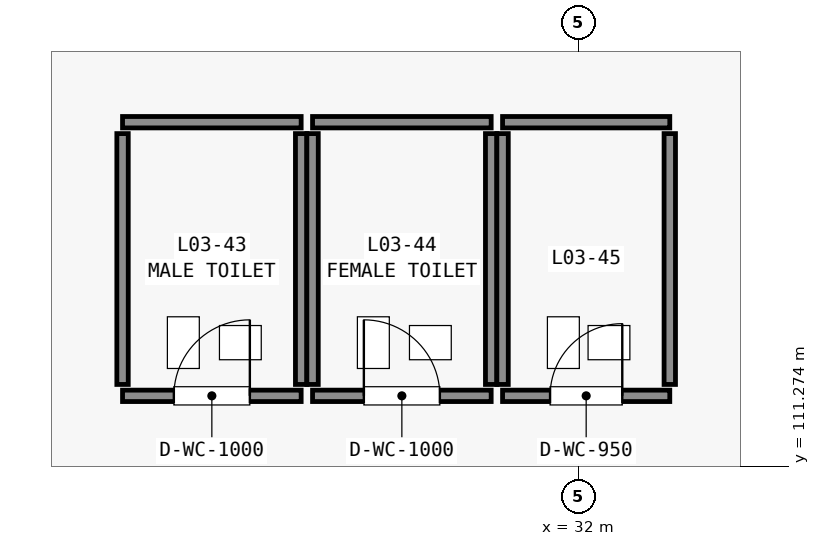
"""IFC4 building model, lengths in metres.
Left out: names, types, materials, properties, quantities, classifications, styles, units other than length and angle.
Written with IfcOpenShell. Run it as: python <this file> out.ifc"""

import sys

from ifc_helpers import new_model, si_unit, direction, frame, frame_2d, origin, place, context, subcontext, project, spatial, rectangle, extrude, element, fill, save


model = new_model("IFC4")
c1 = context("Model", 3, precision=1e-05, world=origin(), true_north=direction((0.0, 1.0)))
c2 = subcontext(c1, "Body", "Model", "MODEL_VIEW")
j1 = project(units=[si_unit("LENGTHUNIT", "METRE"), si_unit("PLANEANGLEUNIT", "RADIAN")], contexts=[c1])
p1 = place(None, origin())
s1 = spatial("IfcSite", under=j1, at=p1, CompositionType="ELEMENT")
p2 = place(p1, origin())
s2 = spatial("IfcBuilding", under=s1, at=p2, CompositionType="ELEMENT")
p3 = place(p2, frame((0.0, 0.0, 16.2)))
s3 = spatial("IfcBuildingStorey", under=s2, at=p3, CompositionType="ELEMENT", Elevation=16.2)
p4 = place(p3, frame((26.0, 112.2, 0.0), z_axis=(0.0, 0.0, 1.0), x_axis=(1.0, 0.0, 0.0)))
e1 = element("IfcWall", 1, at=p4, inside=s3, PredefinedType="STANDARD", context=c2, shape_type="SweptSolid", body=[
    extrude(rectangle(XDim=2.35, YDim=0.15, at=frame_2d((1.175, 0.0))), origin(), (0.0, 0.0, 1.0), 4.46),
])
p5 = place(p4, frame((0.675, 0.0, 0.0)))
e2 = element("IfcOpeningElement", 2, at=p5, cuts=e1, PredefinedType="OPENING", context=c2, shape_type="SweptSolid", body=[
    extrude(rectangle(XDim=1.0, YDim=2.15, at=frame_2d((0.5, 1.075))), frame((0.0, 0.085, 0.0), z_axis=(0.0, -1.0, 0.0), x_axis=(1.0, 0.0, 0.0)), (0.0, 0.0, 1.0), 0.17),
])
p6 = place(p3, frame((26.0, 115.8, 0.0), z_axis=(0.0, 0.0, 1.0), x_axis=(1.0, 0.0, 0.0)))
e3 = element("IfcWall", 3, at=p6, inside=s3, PredefinedType="STANDARD", context=c2, shape_type="SweptSolid", body=[
    extrude(rectangle(XDim=2.35, YDim=0.15, at=frame_2d((1.175, 0.0))), origin(), (0.0, 0.0, 1.0), 4.46),
])
for number, where, z_axis, x_axis in (
    (4, (26.0, 112.35, 0.0), (0.0, 0.0, 1.0), (0.0, 1.0, 0.0)),
    (5, (28.35, 112.35, 0.0), (0.0, 0.0, 1.0), (0.0, 1.0, 0.0)),
):
    element("IfcWall", number, at=place(p3, frame(where, z_axis=z_axis, x_axis=x_axis)), inside=s3, PredefinedType="STANDARD", context=c2, shape_type="SweptSolid", body=[
        extrude(rectangle(XDim=3.3, YDim=0.15, at=frame_2d((1.65, 0.0))), origin(), (0.0, 0.0, 1.0), 4.003),
    ])
p7 = place(p3, frame((28.5, 112.2, 0.0), z_axis=(0.0, 0.0, 1.0), x_axis=(1.0, 0.0, 0.0)))
e6 = element("IfcWall", 6, at=p7, inside=s3, PredefinedType="STANDARD", context=c2, shape_type="SweptSolid", body=[
    extrude(rectangle(XDim=2.35, YDim=0.15, at=frame_2d((1.175, 0.0))), origin(), (0.0, 0.0, 1.0), 4.46),
])
p8 = place(p7, frame((0.675, 0.0, 0.0)))
e7 = element("IfcOpeningElement", 7, at=p8, cuts=e6, PredefinedType="OPENING", context=c2, shape_type="SweptSolid", body=[
    extrude(rectangle(XDim=1.0, YDim=2.15, at=frame_2d((0.5, 1.075))), frame((0.0, 0.085, 0.0), z_axis=(0.0, -1.0, 0.0), x_axis=(1.0, 0.0, 0.0)), (0.0, 0.0, 1.0), 0.17),
])
p9 = place(p3, frame((28.5, 115.8, 0.0), z_axis=(0.0, 0.0, 1.0), x_axis=(1.0, 0.0, 0.0)))
e8 = element("IfcWall", 8, at=p9, inside=s3, PredefinedType="STANDARD", context=c2, shape_type="SweptSolid", body=[
    extrude(rectangle(XDim=2.35, YDim=0.15, at=frame_2d((1.175, 0.0))), origin(), (0.0, 0.0, 1.0), 4.46),
])
for number, where, z_axis, x_axis in (
    (9, (28.5, 112.35, 0.0), (0.0, 0.0, 1.0), (0.0, 1.0, 0.0)),
    (10, (30.85, 112.35, 0.0), (0.0, 0.0, 1.0), (0.0, 1.0, 0.0)),
):
    element("IfcWall", number, at=place(p3, frame(where, z_axis=z_axis, x_axis=x_axis)), inside=s3, PredefinedType="STANDARD", context=c2, shape_type="SweptSolid", body=[
        extrude(rectangle(XDim=3.3, YDim=0.15, at=frame_2d((1.65, 0.0))), origin(), (0.0, 0.0, 1.0), 4.003),
    ])
p10 = place(p3, frame((31.0, 112.2, 0.0), z_axis=(0.0, 0.0, 1.0), x_axis=(1.0, 0.0, 0.0)))
e11 = element("IfcWall", 11, at=p10, inside=s3, PredefinedType="STANDARD", context=c2, shape_type="SweptSolid", body=[
    extrude(rectangle(XDim=2.2, YDim=0.15, at=frame_2d((1.1, 0.0))), origin(), (0.0, 0.0, 1.0), 4.46),
])
p11 = place(p10, frame((0.625, 0.0, 0.0)))
e12 = element("IfcOpeningElement", 12, at=p11, cuts=e11, PredefinedType="OPENING", context=c2, shape_type="SweptSolid", body=[
    extrude(rectangle(XDim=0.95, YDim=2.15, at=frame_2d((0.475, 1.075))), frame((0.0, 0.085, 0.0), z_axis=(0.0, -1.0, 0.0), x_axis=(1.0, 0.0, 0.0)), (0.0, 0.0, 1.0), 0.17),
])
p12 = place(p3, frame((31.0, 115.8, 0.0), z_axis=(0.0, 0.0, 1.0), x_axis=(1.0, 0.0, 0.0)))
e13 = element("IfcWall", 13, at=p12, inside=s3, PredefinedType="STANDARD", context=c2, shape_type="SweptSolid", body=[
    extrude(rectangle(XDim=2.2, YDim=0.15, at=frame_2d((1.1, 0.0))), origin(), (0.0, 0.0, 1.0), 4.46),
])
for number, where, z_axis, x_axis in (
    (14, (31.0, 112.35, 0.0), (0.0, 0.0, 1.0), (0.0, 1.0, 0.0)),
    (15, (33.2, 112.35, 0.0), (0.0, 0.0, 1.0), (0.0, 1.0, 0.0)),
):
    element("IfcWall", number, at=place(p3, frame(where, z_axis=z_axis, x_axis=x_axis)), inside=s3, PredefinedType="STANDARD", context=c2, shape_type="SweptSolid", body=[
        extrude(rectangle(XDim=3.3, YDim=0.15, at=frame_2d((1.65, 0.0))), origin(), (0.0, 0.0, 1.0), 4.003),
    ])
p13 = place(p5, origin())
e16 = element("IfcDoor", 16, at=p13, inside=s3, OperationType="SINGLE_SWING_RIGHT", PredefinedType="DOOR", context=c2, shape_type="SweptSolid", body=[
    extrude(rectangle(XDim=1.0, YDim=2.15, at=frame_2d((0.5, 1.075))), frame((0.0, 0.025, 0.0), z_axis=(0.0, -1.0, 0.0), x_axis=(1.0, 0.0, 0.0)), (0.0, 0.0, 1.0), 0.05),
])
fill(e2, e16)
p14 = place(p8, origin())
e17 = element("IfcDoor", 17, at=p14, inside=s3, OperationType="SINGLE_SWING_LEFT", PredefinedType="DOOR", context=c2, shape_type="SweptSolid", body=[
    extrude(rectangle(XDim=1.0, YDim=2.15, at=frame_2d((0.5, 1.075))), frame((0.0, 0.025, 0.0), z_axis=(0.0, -1.0, 0.0), x_axis=(1.0, 0.0, 0.0)), (0.0, 0.0, 1.0), 0.05),
])
fill(e7, e17)
p15 = place(p11, origin())
e18 = element("IfcDoor", 18, at=p15, inside=s3, OperationType="SINGLE_SWING_RIGHT", PredefinedType="DOOR", context=c2, shape_type="SweptSolid", body=[
    extrude(rectangle(XDim=0.95, YDim=2.15, at=frame_2d((0.475, 1.075))), frame((0.0, 0.025, 0.0), z_axis=(0.0, -1.0, 0.0), x_axis=(1.0, 0.0, 0.0)), (0.0, 0.0, 1.0), 0.05),
])
fill(e12, e18)
save(model, sys.argv[1])
